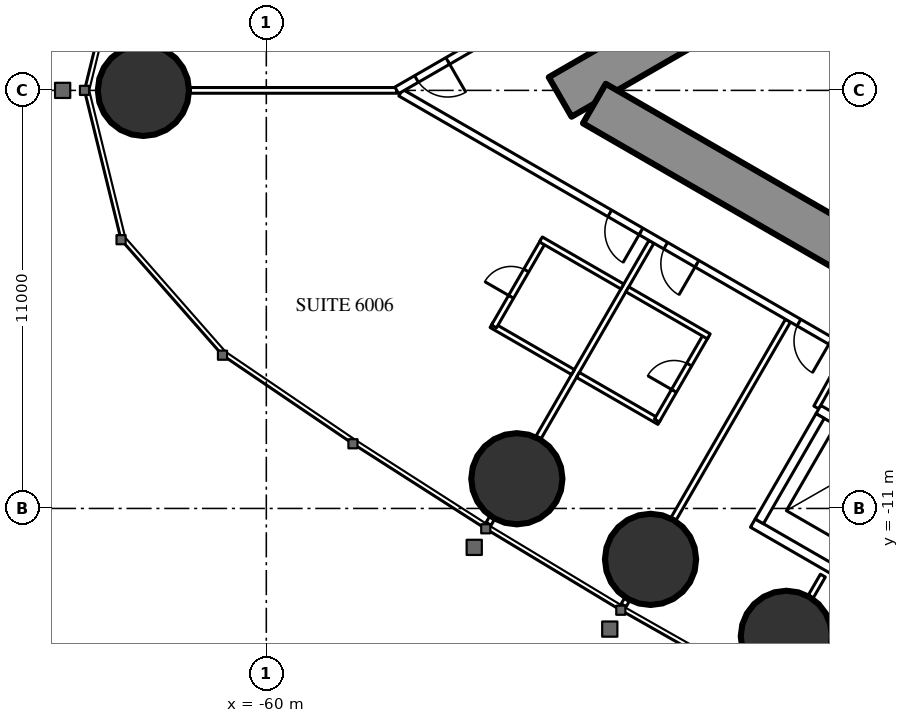
"""IFC4 building model, lengths in metres.
Left out: names, types, materials, properties, quantities, classifications, styles, units other than length and angle.
Written with IfcOpenShell. Run it as: python <this file> out.ifc"""

import sys

from ifc_helpers import new_model, si_unit, direction, frame, frame_2d, origin, origin_2d, place, context, subcontext, project, spatial, rectangle, circle, extrude, element, fill, save


model = new_model("IFC4")
c1 = context("Model", 3, precision=1e-05, world=origin(), true_north=direction((0.0, 1.0)))
c2 = subcontext(c1, "Body", "Model", "MODEL_VIEW")
j1 = project(units=[si_unit("LENGTHUNIT", "METRE"), si_unit("PLANEANGLEUNIT", "RADIAN")], contexts=[c1])
p1 = place(None, origin())
s1 = spatial("IfcSite", under=j1, at=p1, CompositionType="ELEMENT")
p2 = place(p1, origin())
s2 = spatial("IfcBuilding", under=s1, at=p2, CompositionType="ELEMENT")
p3 = place(p2, frame((0.0, 0.0, 226.1)))
s3 = spatial("IfcBuildingStorey", under=s2, at=p3, CompositionType="ELEMENT", Elevation=226.1)
for number, where, z_axis, x_axis in (
    (1, (-63.234, 0.0, 0.0), (0.0, 0.0, 1.0), (1.0, 0.0, 0.0)),
    (2, (-53.408, -10.219, 0.0), (0.0, 0.0, 1.0), (1.0, 0.0, 0.0)),
    (3, (-49.89, -12.34, 0.0), (0.0, 0.0, 1.0), (1.0, 0.0, 0.0)),
    (4, (-46.317, -14.365, 0.0), (0.0, 0.0, 1.0), (1.0, 0.0, 0.0)),
):
    element("IfcColumn", number, at=place(p3, frame(where, z_axis=z_axis, x_axis=x_axis)), inside=s3, PredefinedType="COLUMN", context=c2, shape_type="SweptSolid", body=[
        extrude(circle(Radius=1.2, at=origin_2d()), origin(), (0.0, 0.0, 1.0), 3.6),
    ])
p4 = place(p3, frame((-27.2, 14.3, 0.0), z_axis=(0.0, 0.0, 1.0), x_axis=(-0.866026593062, -0.499997940104, 0.0)))
e5 = element("IfcWall", 5, at=p4, inside=s3, PredefinedType="SHEAR", context=c2, shape_type="SweptSolid", body=[
    extrude(rectangle(XDim=28.946, YDim=1.2, at=frame_2d((14.473, 0.0))), origin(), (0.0, 0.0, 1.0), 3.6),
])
p5 = place(p4, frame((4.6, 0.0, 0.0)))
e6 = element("IfcOpeningElement", 6, at=p5, cuts=e5, PredefinedType="OPENING", context=c2, shape_type="SweptSolid", body=[
    extrude(rectangle(XDim=1.0, YDim=2.2, at=frame_2d((0.5, 1.1))), frame((0.0, 0.61, 0.0), z_axis=(0.0, -1.0, 0.0), x_axis=(1.0, 0.0, 0.0)), (0.0, 0.0, 1.0), 1.22),
])
p6 = place(p4, frame((13.395, 0.0, 0.0)))
e7 = element("IfcOpeningElement", 7, at=p6, cuts=e5, PredefinedType="OPENING", context=c2, shape_type="SweptSolid", body=[
    extrude(rectangle(XDim=1.8, YDim=2.2, at=frame_2d((0.9, 1.1))), frame((0.0, 0.61, 0.0), z_axis=(0.0, -1.0, 0.0), x_axis=(1.0, 0.0, 0.0)), (0.0, 0.0, 1.0), 1.22),
])
p7 = place(p3, frame((-27.2, -14.3, 0.0), z_axis=(0.0, 0.0, 1.0), x_axis=(-0.866024021859, 0.500002393557, 0.0)))
e8 = element("IfcWall", 8, at=p7, inside=s3, PredefinedType="SHEAR", context=c2, shape_type="SweptSolid", body=[
    extrude(rectangle(XDim=27.907, YDim=1.2, at=frame_2d((13.954, 0.0))), origin(), (0.0, 0.0, 1.0), 3.6),
])
p8 = place(p7, frame((4.6, 0.0, 0.0)))
e9 = element("IfcOpeningElement", 9, at=p8, cuts=e8, PredefinedType="OPENING", context=c2, shape_type="SweptSolid", body=[
    extrude(rectangle(XDim=1.0, YDim=2.2, at=frame_2d((0.5, 1.1))), frame((0.0, 0.61, 0.0), z_axis=(0.0, -1.0, 0.0), x_axis=(1.0, 0.0, 0.0)), (0.0, 0.0, 1.0), 1.22),
])
p9 = place(p7, frame((13.395, 0.0, 0.0)))
e10 = element("IfcOpeningElement", 10, at=p9, cuts=e8, PredefinedType="OPENING", context=c2, shape_type="SweptSolid", body=[
    extrude(rectangle(XDim=1.8, YDim=2.2, at=frame_2d((0.9, 1.1))), frame((0.0, 0.61, 0.0), z_axis=(0.0, -1.0, 0.0), x_axis=(1.0, 0.0, 0.0)), (0.0, 0.0, 1.0), 1.22),
])
p10 = place(p3, frame((-46.274, -6.059, 0.0), z_axis=(0.0, 0.0, 1.0), x_axis=(-0.500020471368, -0.866013584312, 0.0)))
e11 = element("IfcWall", 11, at=p10, inside=s3, PredefinedType="PARTITIONING", context=c2, shape_type="SweptSolid", body=[
    extrude(rectangle(XDim=6.028, YDim=0.15, at=frame_2d((3.014, 0.0))), origin(), (0.0, 0.0, 1.0), 2.45),
])
p11 = place(p3, frame((-50.508, -13.392, 0.0), z_axis=(0.0, 0.0, 1.0), x_axis=(-0.499644091975, -0.866230789891, 0.0)))
e12 = element("IfcWall", 12, at=p11, inside=s3, PredefinedType="PARTITIONING", context=c2, shape_type="SweptSolid", body=[
    extrude(rectangle(XDim=0.18, YDim=0.15, at=frame_2d((0.09, 0.0))), origin(), (0.0, 0.0, 1.0), 2.45),
])
p12 = place(p3, frame((-49.866, -3.985, 0.0), z_axis=(0.0, 0.0, 1.0), x_axis=(-0.500000694566, -0.866025002776, 0.0)))
e13 = element("IfcWall", 13, at=p12, inside=s3, PredefinedType="PARTITIONING", context=c2, shape_type="SweptSolid", body=[
    extrude(rectangle(XDim=5.95, YDim=0.15, at=frame_2d((2.975, 0.0))), origin(), (0.0, 0.0, 1.0), 2.45),
])
p13 = place(p3, frame((-54.061, -11.25, 0.0), z_axis=(0.0, 0.0, 1.0), x_axis=(-0.500391173478, -0.865799441849, 0.0)))
e14 = element("IfcWall", 14, at=p13, inside=s3, PredefinedType="PARTITIONING", context=c2, shape_type="SweptSolid", body=[
    extrude(rectangle(XDim=0.179, YDim=0.15, at=frame_2d((0.089, 0.0))), origin(), (0.0, 0.0, 1.0), 2.45),
])
p14 = place(p3, frame((-56.568, 0.0, 0.0), z_axis=(0.0, 0.0, 1.0), x_axis=(-1.0, 0.0, 0.0)))
e15 = element("IfcWall", 15, at=p14, inside=s3, PredefinedType="PARTITIONING", context=c2, shape_type="SweptSolid", body=[
    extrude(rectangle(XDim=5.446, YDim=0.15, at=frame_2d((2.723, 0.0))), origin(), (0.0, 0.0, 1.0), 2.45),
])
p15 = place(p3, frame((-45.356, -12.767, 0.0), z_axis=(0.0, 0.0, 1.0), x_axis=(-0.499886366516, -0.866091000168, 0.0)))
e16 = element("IfcWall", 16, at=p15, inside=s3, PredefinedType="PARTITIONING", context=c2, shape_type="SweptSolid", body=[
    extrude(rectangle(XDim=0.645, YDim=0.15, at=frame_2d((0.322, 0.0))), origin(), (0.0, 0.0, 1.0), 3.35),
])
p16 = place(p3, frame((-44.715, -6.844, 0.0), z_axis=(0.0, 0.0, 1.0), x_axis=(-0.866025261224, 0.500000246922, 0.0)))
e17 = element("IfcWall", 17, at=p16, inside=s3, PredefinedType="PARTITIONING", context=c2, shape_type="SweptSolid", body=[
    extrude(rectangle(XDim=13.567, YDim=0.2, at=frame_2d((6.783, 0.0))), origin(), (0.0, 0.0, 1.0), 3.35),
])
p17 = place(p16, frame((6.266, 0.0, 0.0)))
e18 = element("IfcOpeningElement", 18, at=p17, cuts=e17, PredefinedType="OPENING", context=c2, shape_type="SweptSolid", body=[
    extrude(rectangle(XDim=0.95, YDim=2.2, at=frame_2d((0.475, 1.1))), frame((0.0, 0.11, 0.0), z_axis=(0.0, -1.0, 0.0), x_axis=(1.0, 0.0, 0.0)), (0.0, 0.0, 1.0), 0.22),
])
p18 = place(p16, frame((4.565, 0.0, 0.0)))
e19 = element("IfcOpeningElement", 19, at=p18, cuts=e17, PredefinedType="OPENING", context=c2, shape_type="SweptSolid", body=[
    extrude(rectangle(XDim=0.95, YDim=2.2, at=frame_2d((0.475, 1.1))), frame((0.0, 0.11, 0.0), z_axis=(0.0, -1.0, 0.0), x_axis=(1.0, 0.0, 0.0)), (0.0, 0.0, 1.0), 0.22),
])
p19 = place(p16, frame((0.5, 0.0, 0.0)))
e20 = element("IfcOpeningElement", 20, at=p19, cuts=e17, PredefinedType="OPENING", context=c2, shape_type="SweptSolid", body=[
    extrude(rectangle(XDim=0.967, YDim=2.2, at=frame_2d((0.483, 1.1))), frame((0.0, 0.11, 0.0), z_axis=(0.0, -1.0, 0.0), x_axis=(1.0, 0.0, 0.0)), (0.0, 0.0, 1.0), 0.22),
])
p20 = place(p3, frame((-44.652, -6.764, 0.0), z_axis=(0.0, 0.0, 1.0), x_axis=(-0.485424724123, -0.874278466629, 0.0)))
e21 = element("IfcWall", 21, at=p20, inside=s3, PredefinedType="PARTITIONING", context=c2, shape_type="SweptSolid", body=[
    extrude(rectangle(XDim=1.805, YDim=0.15, at=frame_2d((0.903, 0.0))), origin(), (0.0, 0.0, 1.0), 3.35),
])
p21 = place(p3, frame((-51.931, -7.411, 0.0), z_axis=(0.0, 0.0, 1.0), x_axis=(-0.866006523861, 0.500032699561, 0.0)))
e22 = element("IfcWall", 22, at=p21, inside=s3, PredefinedType="PARTITIONING", context=c2, shape_type="SweptSolid", body=[
    extrude(rectangle(XDim=2.475, YDim=0.15, at=frame_2d((1.237, 0.0))), origin(), (0.0, 0.0, 1.0), 3.35),
])
p22 = place(p3, frame((-52.71, -3.96, 0.0), z_axis=(0.0, 0.0, 1.0), x_axis=(-0.500006934395, -0.866021400173, 0.0)))
e23 = element("IfcWall", 23, at=p22, inside=s3, PredefinedType="PARTITIONING", context=c2, shape_type="SweptSolid", body=[
    extrude(rectangle(XDim=2.6, YDim=0.15, at=frame_2d((1.3, 0.0))), origin(), (0.0, 0.0, 1.0), 3.35),
])
p23 = place(p22, frame((0.9, 0.0, 0.0)))
e24 = element("IfcOpeningElement", 24, at=p23, cuts=e23, PredefinedType="OPENING", context=c2, shape_type="SweptSolid", body=[
    extrude(rectangle(XDim=0.8, YDim=2.2, at=frame_2d((0.4, 1.1))), frame((0.0, 0.085, 0.0), z_axis=(0.0, -1.0, 0.0), x_axis=(1.0, 0.0, 0.0)), (0.0, 0.0, 1.0), 0.17),
])
p24 = place(p3, frame((-50.631, -5.16, 0.0), z_axis=(0.0, 0.0, 1.0), x_axis=(-0.86604923931, 0.499958713387, 0.0)))
e25 = element("IfcWall", 25, at=p24, inside=s3, PredefinedType="PARTITIONING", context=c2, shape_type="SweptSolid", body=[
    extrude(rectangle(XDim=2.475, YDim=0.15, at=frame_2d((1.237, 0.0))), origin(), (0.0, 0.0, 1.0), 2.5),
])
p25 = place(p3, frame((-49.658, -8.724, 0.0), z_axis=(0.0, 0.0, 1.0), x_axis=(-0.866031185235, 0.4999899861, 0.0)))
e26 = element("IfcWall", 26, at=p25, inside=s3, PredefinedType="PARTITIONING", context=c2, shape_type="SweptSolid", body=[
    extrude(rectangle(XDim=2.475, YDim=0.15, at=frame_2d((1.238, 0.0))), origin(), (0.0, 0.0, 1.0), 3.35),
])
p26 = place(p3, frame((-48.423, -6.435, 0.0), z_axis=(0.0, 0.0, 1.0), x_axis=(-0.500006934395, -0.866021400173, 0.0)))
e27 = element("IfcWall", 27, at=p26, inside=s3, PredefinedType="PARTITIONING", context=c2, shape_type="SweptSolid", body=[
    extrude(rectangle(XDim=2.6, YDim=0.15, at=frame_2d((1.3, 0.0))), origin(), (0.0, 0.0, 1.0), 3.35),
])
p27 = place(p26, frame((0.9, 0.0, 0.0)))
e28 = element("IfcOpeningElement", 28, at=p27, cuts=e27, PredefinedType="OPENING", context=c2, shape_type="SweptSolid", body=[
    extrude(rectangle(XDim=0.8, YDim=2.2, at=frame_2d((0.4, 1.1))), frame((0.0, 0.085, 0.0), z_axis=(0.0, -1.0, 0.0), x_axis=(1.0, 0.0, 0.0)), (0.0, 0.0, 1.0), 0.17),
])
p28 = place(p3, frame((-48.358, -6.472, 0.0), z_axis=(0.0, 0.0, 1.0), x_axis=(-0.866073894602, 0.499916002032, 0.0)))
e29 = element("IfcWall", 29, at=p28, inside=s3, PredefinedType="PARTITIONING", context=c2, shape_type="SweptSolid", body=[
    extrude(rectangle(XDim=2.475, YDim=0.15, at=frame_2d((1.238, 0.0))), origin(), (0.0, 0.0, 1.0), 2.5),
])
p29 = place(p3, frame((-49.816, 3.898, 0.0), z_axis=(0.0, 0.0, 1.0), x_axis=(-0.866028102716, -0.499995325284, 0.0)))
e30 = element("IfcWall", 30, at=p29, inside=s3, PredefinedType="PARTITIONING", context=c2, shape_type="SweptSolid", body=[
    extrude(rectangle(XDim=7.796, YDim=0.2, at=frame_2d((3.898, 0.0))), origin(), (0.0, 0.0, 1.0), 3.35),
])
p30 = place(p29, frame((6.246, 0.0, 0.0)))
e31 = element("IfcOpeningElement", 31, at=p30, cuts=e30, PredefinedType="OPENING", context=c2, shape_type="SweptSolid", body=[
    extrude(rectangle(XDim=0.95, YDim=2.2, at=frame_2d((0.475, 1.1))), frame((0.0, 0.11, 0.0), z_axis=(0.0, -1.0, 0.0), x_axis=(1.0, 0.0, 0.0)), (0.0, 0.0, 1.0), 0.22),
])
p31 = place(p3, frame((-39.758, -11.697, 0.0), z_axis=(0.0, 0.0, 1.0), x_axis=(-0.866024194504, 0.500002094529, 0.0)))
e32 = element("IfcWall", 32, at=p31, inside=s3, PredefinedType="PARTITIONING", context=c2, shape_type="SweptSolid", body=[
    extrude(rectangle(XDim=6.6, YDim=0.25, at=frame_2d((3.3, 0.0))), origin(), (0.0, 0.0, 1.0), 3.35),
])
p32 = place(p31, frame((0.75, 0.0, 0.0)))
e33 = element("IfcOpeningElement", 33, at=p32, cuts=e32, PredefinedType="OPENING", context=c2, shape_type="SweptSolid", body=[
    extrude(rectangle(XDim=1.1, YDim=2.2, at=frame_2d((0.55, 1.1))), frame((0.0, 0.135, 0.0), z_axis=(0.0, -1.0, 0.0), x_axis=(1.0, 0.0, 0.0)), (0.0, 0.0, 1.0), 0.27),
])
p33 = place(p31, frame((2.75, 0.0, 0.0)))
e34 = element("IfcOpeningElement", 34, at=p33, cuts=e32, PredefinedType="OPENING", context=c2, shape_type="SweptSolid", body=[
    extrude(rectangle(XDim=1.1, YDim=2.2, at=frame_2d((0.55, 1.1))), frame((0.0, 0.135, 0.0), z_axis=(0.0, -1.0, 0.0), x_axis=(1.0, 0.0, 0.0)), (0.0, 0.0, 1.0), 0.27),
])
p34 = place(p31, frame((4.75, 0.0, 0.0)))
e35 = element("IfcOpeningElement", 35, at=p34, cuts=e32, PredefinedType="OPENING", context=c2, shape_type="SweptSolid", body=[
    extrude(rectangle(XDim=1.1, YDim=2.2, at=frame_2d((0.55, 1.1))), frame((0.0, 0.135, 0.0), z_axis=(0.0, -1.0, 0.0), x_axis=(1.0, 0.0, 0.0)), (0.0, 0.0, 1.0), 0.27),
])
p35 = place(p3, frame((-41.482, -14.686, 0.0), z_axis=(0.0, 0.0, 1.0), x_axis=(-0.86603344179, 0.499986077507, 0.0)))
e36 = element("IfcWall", 36, at=p35, inside=s3, PredefinedType="PARTITIONING", context=c2, shape_type="SweptSolid", body=[
    extrude(rectangle(XDim=6.6, YDim=0.25, at=frame_2d((3.3, 0.0))), origin(), (0.0, 0.0, 1.0), 3.35),
])
p36 = place(p3, frame((-45.428, -8.568, 0.0), z_axis=(0.0, 0.0, 1.0), x_axis=(-0.499929347863, -0.866066190972, 0.0)))
e37 = element("IfcWall", 37, at=p36, inside=s3, PredefinedType="PARTITIONING", context=c2, shape_type="SweptSolid", body=[
    extrude(rectangle(XDim=3.201, YDim=0.25, at=frame_2d((1.6, 0.0))), origin(), (0.0, 0.0, 1.0), 3.35),
])
p37 = place(p30, origin())
e38 = element("IfcDoor", 38, at=p37, inside=s3, OperationType="SINGLE_SWING_LEFT", PredefinedType="DOOR", context=c2, shape_type="SweptSolid", body=[
    extrude(rectangle(XDim=0.95, YDim=2.2, at=frame_2d((0.475, 1.1))), frame((0.0, 0.025, 0.0), z_axis=(0.0, -1.0, 0.0), x_axis=(1.0, 0.0, 0.0)), (0.0, 0.0, 1.0), 0.05),
])
fill(e31, e38)
p38 = place(p23, origin())
e39 = element("IfcDoor", 39, at=p38, inside=s3, OperationType="SINGLE_SWING_RIGHT", PredefinedType="DOOR", context=c2, shape_type="SweptSolid", body=[
    extrude(rectangle(XDim=0.8, YDim=2.2, at=frame_2d((0.4, 1.1))), frame((0.0, 0.025, 0.0), z_axis=(0.0, -1.0, 0.0), x_axis=(1.0, 0.0, 0.0)), (0.0, 0.0, 1.0), 0.05),
])
fill(e24, e39)
p39 = place(p17, origin())
e40 = element("IfcDoor", 40, at=p39, inside=s3, OperationType="SINGLE_SWING_LEFT", PredefinedType="DOOR", context=c2, shape_type="SweptSolid", body=[
    extrude(rectangle(XDim=0.95, YDim=2.2, at=frame_2d((0.475, 1.1))), frame((0.0, 0.025, 0.0), z_axis=(0.0, -1.0, 0.0), x_axis=(1.0, 0.0, 0.0)), (0.0, 0.0, 1.0), 0.05),
])
fill(e18, e40)
p40 = place(p27, origin())
e41 = element("IfcDoor", 41, at=p40, inside=s3, OperationType="SINGLE_SWING_RIGHT", PredefinedType="DOOR", context=c2, shape_type="SweptSolid", body=[
    extrude(rectangle(XDim=0.8, YDim=2.2, at=frame_2d((0.4, 1.1))), frame((0.0, 0.025, 0.0), z_axis=(0.0, -1.0, 0.0), x_axis=(1.0, 0.0, 0.0)), (0.0, 0.0, 1.0), 0.05),
])
fill(e28, e41)
p41 = place(p18, origin())
e42 = element("IfcDoor", 42, at=p41, inside=s3, OperationType="SINGLE_SWING_LEFT", PredefinedType="DOOR", context=c2, shape_type="SweptSolid", body=[
    extrude(rectangle(XDim=0.95, YDim=2.2, at=frame_2d((0.475, 1.1))), frame((0.0, 0.025, 0.0), z_axis=(0.0, -1.0, 0.0), x_axis=(1.0, 0.0, 0.0)), (0.0, 0.0, 1.0), 0.05),
])
fill(e19, e42)
p42 = place(p19, origin())
e43 = element("IfcDoor", 43, at=p42, inside=s3, OperationType="SINGLE_SWING_LEFT", PredefinedType="DOOR", context=c2, shape_type="SweptSolid", body=[
    extrude(rectangle(XDim=0.967, YDim=2.2, at=frame_2d((0.483, 1.1))), frame((0.0, 0.025, 0.0), z_axis=(0.0, -1.0, 0.0), x_axis=(1.0, 0.0, 0.0)), (0.0, 0.0, 1.0), 0.05),
])
fill(e20, e43)
save(model, sys.argv[1])
